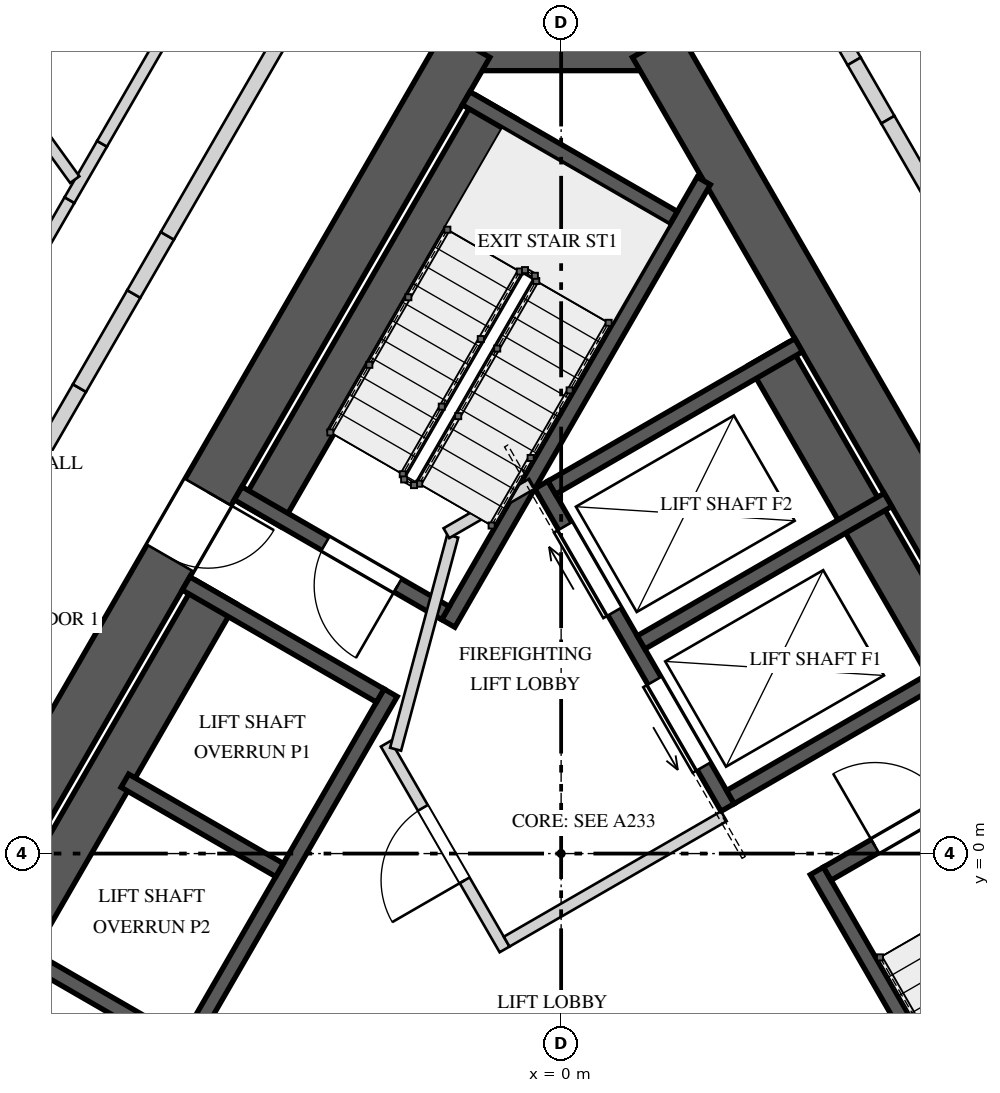
"""IFC4 building model, lengths in metres.
Left out: names, types, materials, properties, quantities, classifications, styles, units other than length and angle.
Written with IfcOpenShell. Run it as: python <this file> out.ifc"""

import sys

from ifc_helpers import new_model, si_unit, direction, frame, frame_2d, origin, place, context, subcontext, project, spatial, rectangle, extrude, element, fill, save


model = new_model("IFC4")
c1 = context("Model", 3, precision=1e-05, world=origin(), true_north=direction((0.0, 1.0)))
c2 = subcontext(c1, "Body", "Model", "MODEL_VIEW")
j1 = project(units=[si_unit("LENGTHUNIT", "METRE"), si_unit("PLANEANGLEUNIT", "RADIAN")], contexts=[c1])
p1 = place(None, origin())
s1 = spatial("IfcSite", under=j1, at=p1, CompositionType="ELEMENT")
p2 = place(p1, origin())
s2 = spatial("IfcBuilding", under=s1, at=p2, CompositionType="ELEMENT")
p3 = place(p2, frame((0.0, 0.0, 241.2)))
s3 = spatial("IfcBuildingStorey", under=s2, at=p3, CompositionType="ELEMENT", Elevation=241.2)
p4 = place(p3, frame((1.443, 10.65, 0.0), z_axis=(0.0, 0.0, 1.0), x_axis=(-1.0, 0.0, 0.0)))
e1 = element("IfcWall", 1, at=p4, inside=s3, PredefinedType="SHEAR", context=c2, shape_type="SweptSolid", body=[
    extrude(rectangle(XDim=2.887, YDim=0.7, at=frame_2d((1.443, 0.0))), origin(), (0.0, 0.0, 1.0), 4.0),
])
p5 = place(p3, frame((-1.241, 10.65, 0.0), z_axis=(0.0, 0.0, 1.0), x_axis=(-0.500003331888, -0.866023480109, 0.0)))
e2 = element("IfcWall", 2, at=p5, inside=s3, PredefinedType="SHEAR", context=c2, shape_type="SweptSolid", body=[
    extrude(rectangle(XDim=17.205, YDim=0.7, at=frame_2d((8.603, 0.0))), origin(), (0.0, 0.0, 1.0), 4.0),
])
p6 = place(p5, frame((6.808, 0.0, 0.0)))
e3 = element("IfcOpeningElement", 3, at=p6, cuts=e2, PredefinedType="OPENING", context=c2, shape_type="SweptSolid", body=[
    extrude(rectangle(XDim=1.0, YDim=2.4, at=frame_2d((0.5, 1.2))), frame((0.0, 0.36, 0.0), z_axis=(0.0, -1.0, 0.0), x_axis=(1.0, 0.0, 0.0)), (0.0, 0.0, 1.0), 0.72),
])
p7 = place(p5, frame((14.922, 0.0, 0.0)))
e4 = element("IfcOpeningElement", 4, at=p7, cuts=e2, PredefinedType="OPENING", context=c2, shape_type="SweptSolid", body=[
    extrude(rectangle(XDim=0.8, YDim=2.1, at=frame_2d((0.4, 1.05))), frame((0.0, 0.36, 0.0), z_axis=(0.0, -1.0, 0.0), x_axis=(1.0, 0.0, 0.0)), (0.0, 0.0, 1.0), 0.72),
])
p8 = place(p3, frame((9.844, -4.25, 0.0), z_axis=(0.0, 0.0, 1.0), x_axis=(-0.500003331888, 0.866023480109, 0.0)))
e5 = element("IfcWall", 5, at=p8, inside=s3, PredefinedType="SHEAR", context=c2, shape_type="SweptSolid", body=[
    extrude(rectangle(XDim=17.205, YDim=0.7, at=frame_2d((8.603, 0.0))), origin(), (0.0, 0.0, 1.0), 4.0),
])
p9 = place(p8, frame((6.877, 0.0, 0.0)))
e6 = element("IfcOpeningElement", 6, at=p9, cuts=e5, PredefinedType="OPENING", context=c2, shape_type="SweptSolid", body=[
    extrude(rectangle(XDim=1.0, YDim=2.4, at=frame_2d((0.5, 1.2))), frame((0.0, 0.36, 0.0), z_axis=(0.0, -1.0, 0.0), x_axis=(1.0, 0.0, 0.0)), (0.0, 0.0, 1.0), 0.72),
])
p10 = place(p3, frame((-0.853, 9.823, 0.0), z_axis=(0.0, 0.0, 1.0), x_axis=(-0.500009909098, -0.866019682689, 0.0)))
e7 = element("IfcWall", 7, at=p10, inside=s3, PredefinedType="SOLIDWALL", context=c2, shape_type="SweptSolid", body=[
    extrude(rectangle(XDim=6.2, YDim=0.6, at=frame_2d((3.1, 0.0))), origin(), (0.0, 0.0, 1.0), 3.65),
])
p11 = place(p3, frame((1.876, 8.85, 0.0), z_axis=(0.0, 0.0, 1.0), x_axis=(-0.499998042495, -0.866026533947, 0.0)))
e8 = element("IfcWall", 8, at=p11, inside=s3, PredefinedType="SOLIDWALL", context=c2, shape_type="SweptSolid", body=[
    extrude(rectangle(XDim=6.723, YDim=0.2, at=frame_2d((3.361, 0.0))), origin(), (0.0, 0.0, 1.0), 3.65),
])
p12 = place(p3, frame((1.479, 8.361, 0.0), z_axis=(0.0, 0.0, 1.0), x_axis=(-0.866035871367, 0.499981869177, 0.0)))
e9 = element("IfcWall", 9, at=p12, inside=s3, PredefinedType="SOLIDWALL", context=c2, shape_type="SweptSolid", body=[
    extrude(rectangle(XDim=3.15, YDim=0.2, at=frame_2d((1.575, 0.0))), origin(), (0.0, 0.0, 1.0), 3.65),
])
p13 = place(p3, frame((-1.521, 3.165, 0.0), z_axis=(0.0, 0.0, 1.0), x_axis=(-0.866035871367, 0.499981869177, 0.0)))
e10 = element("IfcWall", 10, at=p13, inside=s3, PredefinedType="SOLIDWALL", context=c2, shape_type="SweptSolid", body=[
    extrude(rectangle(XDim=3.15, YDim=0.2, at=frame_2d((1.575, 0.0))), origin(), (0.0, 0.0, 1.0), 3.65),
])
p14 = place(p13, frame((0.725, 0.0, 0.0)))
e11 = element("IfcOpeningElement", 11, at=p14, cuts=e10, PredefinedType="OPENING", context=c2, shape_type="SweptSolid", body=[
    extrude(rectangle(XDim=1.1, YDim=2.4, at=frame_2d((0.55, 1.2))), frame((0.0, 0.11, 0.0), z_axis=(0.0, -1.0, 0.0), x_axis=(1.0, 0.0, 0.0)), (0.0, 0.0, 1.0), 0.22),
])
p15 = place(p3, frame((6.726, -6.05, 0.0), z_axis=(0.0, 0.0, 1.0), x_axis=(-0.499970804718, 0.866042259032, 0.0)))
e12 = element("IfcWall", 12, at=p15, inside=s3, PredefinedType="SOLIDWALL", context=c2, shape_type="SweptSolid", body=[
    extrude(rectangle(XDim=6.723, YDim=0.2, at=frame_2d((3.361, 0.0))), origin(), (0.0, 0.0, 1.0), 3.65),
])
p16 = place(p3, frame((3.501, -0.265, 0.0), z_axis=(0.0, 0.0, 1.0), x_axis=(0.866035871367, 0.499981869177, 0.0)))
e13 = element("IfcWall", 13, at=p16, inside=s3, PredefinedType="SOLIDWALL", context=c2, shape_type="SweptSolid", body=[
    extrude(rectangle(XDim=3.15, YDim=0.2, at=frame_2d((1.575, 0.0))), origin(), (0.0, 0.0, 1.0), 3.65),
])
p17 = place(p16, frame((0.725, 0.0, 0.0)))
e14 = element("IfcOpeningElement", 14, at=p17, cuts=e13, PredefinedType="OPENING", context=c2, shape_type="SweptSolid", body=[
    extrude(rectangle(XDim=1.1, YDim=2.4, at=frame_2d((0.55, 1.2))), frame((0.0, 0.11, 0.0), z_axis=(0.0, -1.0, 0.0), x_axis=(1.0, 0.0, 0.0)), (0.0, 0.0, 1.0), 0.22),
])
p18 = place(p3, frame((-2.243, 2.115, 0.0), z_axis=(0.0, 0.0, 1.0), x_axis=(-0.499996545922, -0.866027397988, 0.0)))
e15 = element("IfcWall", 15, at=p18, inside=s3, PredefinedType="SOLIDWALL", context=c2, shape_type="SweptSolid", body=[
    extrude(rectangle(XDim=5.5, YDim=0.2, at=frame_2d((2.75, 0.0))), origin(), (0.0, 0.0, 1.0), 3.65),
])
p19 = place(p3, frame((-4.538, 3.44, 0.0), z_axis=(0.0, 0.0, 1.0), x_axis=(-0.499996545922, -0.866027397988, 0.0)))
e16 = element("IfcWall", 16, at=p19, inside=s3, PredefinedType="SOLIDWALL", context=c2, shape_type="SweptSolid", body=[
    extrude(rectangle(XDim=5.5, YDim=0.6, at=frame_2d((2.75, 0.0))), origin(), (0.0, 0.0, 1.0), 3.65),
])
p20 = place(p3, frame((-2.38, 2.078, 0.0), z_axis=(0.0, 0.0, 1.0), x_axis=(-0.866060182126, 0.499939757307, 0.0)))
e17 = element("IfcWall", 17, at=p20, inside=s3, PredefinedType="SOLIDWALL", context=c2, shape_type="SweptSolid", body=[
    extrude(rectangle(XDim=2.95, YDim=0.2, at=frame_2d((1.475, 0.0))), origin(), (0.0, 0.0, 1.0), 3.65),
])
p21 = place(p3, frame((-3.705, -0.217, 0.0), z_axis=(0.0, 0.0, 1.0), x_axis=(-0.866016039709, 0.500016218704, 0.0)))
e18 = element("IfcWall", 18, at=p21, inside=s3, PredefinedType="SOLIDWALL", context=c2, shape_type="SweptSolid", body=[
    extrude(rectangle(XDim=2.35, YDim=0.2, at=frame_2d((1.175, 0.0))), origin(), (0.0, 0.0, 1.0), 3.65),
])
p22 = place(p3, frame((-5.03, -2.512, 0.0), z_axis=(0.0, 0.0, 1.0), x_axis=(-0.866003658127, 0.500037662692, 0.0)))
e19 = element("IfcWall", 19, at=p22, inside=s3, PredefinedType="SOLIDWALL", context=c2, shape_type="SweptSolid", body=[
    extrude(rectangle(XDim=2.95, YDim=0.2, at=frame_2d((1.475, 0.0))), origin(), (0.0, 0.0, 1.0), 3.65),
])
p23 = place(p3, frame((2.19, 0.606, 0.0), z_axis=(0.0, 0.0, 1.0), x_axis=(-0.500002801628, 0.866023786258, 0.0)))
e20 = element("IfcWall", 20, at=p23, inside=s3, PredefinedType="SOLIDWALL", context=c2, shape_type="SweptSolid", body=[
    extrude(rectangle(XDim=4.9, YDim=0.2, at=frame_2d((2.45, 0.0))), origin(), (0.0, 0.0, 1.0), 3.65),
])
p24 = place(p23, frame((0.625, 0.0, 0.0)))
e21 = element("IfcOpeningElement", 21, at=p24, cuts=e20, PredefinedType="OPENING", context=c2, shape_type="SweptSolid", body=[
    extrude(rectangle(XDim=1.3, YDim=2.1, at=frame_2d((0.65, 1.05))), frame((0.0, 0.11, 0.0), z_axis=(0.0, -1.0, 0.0), x_axis=(1.0, 0.0, 0.0)), (0.0, 0.0, 1.0), 0.22),
])
p25 = place(p23, frame((2.975, 0.0, 0.0)))
e22 = element("IfcOpeningElement", 22, at=p25, cuts=e20, PredefinedType="OPENING", context=c2, shape_type="SweptSolid", body=[
    extrude(rectangle(XDim=1.3, YDim=2.1, at=frame_2d((0.65, 1.05))), frame((0.0, 0.11, 0.0), z_axis=(0.0, -1.0, 0.0), x_axis=(1.0, 0.0, 0.0)), (0.0, 0.0, 1.0), 0.22),
])
p26 = place(p3, frame((5.178, 2.331, 0.0), z_axis=(0.0, 0.0, 1.0), x_axis=(-0.49998122708, 0.866036242063, 0.0)))
e23 = element("IfcWall", 23, at=p26, inside=s3, PredefinedType="SOLIDWALL", context=c2, shape_type="SweptSolid", body=[
    extrude(rectangle(XDim=4.9, YDim=0.6, at=frame_2d((2.45, 0.0))), origin(), (0.0, 0.0, 1.0), 3.65),
])
p27 = place(p3, frame((2.227, 0.743, 0.0), z_axis=(0.0, 0.0, 1.0), x_axis=(0.866022959057, 0.500004234368, 0.0)))
e24 = element("IfcWall", 24, at=p27, inside=s3, PredefinedType="SOLIDWALL", context=c2, shape_type="SweptSolid", body=[
    extrude(rectangle(XDim=3.75, YDim=0.2, at=frame_2d((1.875, 0.0))), origin(), (0.0, 0.0, 1.0), 3.65),
])
p28 = place(p3, frame((1.052, 2.778, 0.0), z_axis=(0.0, 0.0, 1.0), x_axis=(0.866039234136, 0.499976044363, 0.0)))
e25 = element("IfcWall", 25, at=p28, inside=s3, PredefinedType="SOLIDWALL", context=c2, shape_type="SweptSolid", body=[
    extrude(rectangle(XDim=3.75, YDim=0.2, at=frame_2d((1.875, 0.0))), origin(), (0.0, 0.0, 1.0), 3.65),
])
p29 = place(p3, frame((-0.123, 4.813, 0.0), z_axis=(0.0, 0.0, 1.0), x_axis=(0.866022959057, 0.500004234368, 0.0)))
e26 = element("IfcWall", 26, at=p29, inside=s3, PredefinedType="SOLIDWALL", context=c2, shape_type="SweptSolid", body=[
    extrude(rectangle(XDim=3.75, YDim=0.2, at=frame_2d((1.875, 0.0))), origin(), (0.0, 0.0, 1.0), 3.65),
])
p30 = place(p3, frame((-0.744, -1.261, 0.0), z_axis=(0.0, 0.0, 1.0), x_axis=(-0.500004234368, 0.866022959057, 0.0)))
e27 = element("IfcWall", 27, at=p30, inside=s3, PredefinedType="PARTITIONING", context=c2, shape_type="SweptSolid", body=[
    extrude(rectangle(XDim=3.125, YDim=0.15, at=frame_2d((1.562, 0.0))), origin(), (0.0, 0.0, 1.0), 3.65),
])
p31 = place(p30, frame((1.05, 0.0, 0.0)))
e28 = element("IfcOpeningElement", 28, at=p31, cuts=e27, PredefinedType="OPENING", context=c2, shape_type="SweptSolid", body=[
    extrude(rectangle(XDim=1.1, YDim=2.4, at=frame_2d((0.55, 1.2))), frame((0.0, 0.085, 0.0), z_axis=(0.0, -1.0, 0.0), x_axis=(1.0, 0.0, 0.0)), (0.0, 0.0, 1.0), 0.17),
])
p32 = place(p3, frame((-0.717, -1.159, 0.0), z_axis=(0.0, 0.0, 1.0), x_axis=(0.866008176907, 0.50002983664, 0.0)))
e29 = element("IfcWall", 29, at=p32, inside=s3, PredefinedType="PARTITIONING", context=c2, shape_type="SweptSolid", body=[
    extrude(rectangle(XDim=3.3, YDim=0.15, at=frame_2d((1.65, 0.0))), origin(), (0.0, 0.0, 1.0), 3.65),
])
p33 = place(p3, frame((-2.178, 1.372, 0.0), z_axis=(0.0, 0.0, 1.0), x_axis=(0.258808958833, 0.96592852884, 0.0)))
e30 = element("IfcWall", 30, at=p33, inside=s3, PredefinedType="PARTITIONING", context=c2, shape_type="SweptSolid", body=[
    extrude(rectangle(XDim=2.903, YDim=0.15, at=frame_2d((1.451, 0.0))), origin(), (0.0, 0.0, 1.0), 3.65),
])
p34 = place(p3, frame((-1.51, 4.215, 0.0), z_axis=(0.0, 0.0, 1.0), x_axis=(0.866085525409, 0.49989585183, 0.0)))
e31 = element("IfcWall", 31, at=p34, inside=s3, PredefinedType="PARTITIONING", context=c2, shape_type="SweptSolid", body=[
    extrude(rectangle(XDim=1.3, YDim=0.15, at=frame_2d((0.65, 0.0))), origin(), (0.0, 0.0, 1.0), 3.65),
])
p35 = place(p3, frame((-7.38, 7.017, 0.0), z_axis=(0.0, 0.0, 1.0), x_axis=(0.500012159746, 0.866018383238, 0.0)))
e32 = element("IfcWall", 32, at=p35, inside=s3, PredefinedType="PARTITIONING", context=c2, shape_type="SweptSolid", body=[
    extrude(rectangle(XDim=1.824, YDim=0.15, at=frame_2d((0.912, 0.0))), origin(), (0.0, 0.0, 1.0), 3.65),
])
p36 = place(p3, frame((-6.468, 8.597, 0.0), z_axis=(0.0, 0.0, 1.0), x_axis=(0.500035209441, 0.86600507465, 0.0)))
e33 = element("IfcWall", 33, at=p36, inside=s3, PredefinedType="PARTITIONING", context=c2, shape_type="SweptSolid", body=[
    extrude(rectangle(XDim=0.856, YDim=0.15, at=frame_2d((0.428, 0.0))), origin(), (0.0, 0.0, 1.0), 2.75),
])
p37 = place(p3, frame((-6.04, 9.338, 0.0), z_axis=(0.0, 0.0, 1.0), x_axis=(0.500014044516, 0.866017295027, 0.0)))
e34 = element("IfcWall", 34, at=p37, inside=s3, PredefinedType="PARTITIONING", context=c2, shape_type="SweptSolid", body=[
    extrude(rectangle(XDim=5.556, YDim=0.15, at=frame_2d((2.778, 0.0))), origin(), (0.0, 0.0, 1.0), 3.65),
])
p38 = place(p37, frame((1.971, 0.0, 0.0)))
e35 = element("IfcOpeningElement", 35, at=p38, cuts=e34, PredefinedType="OPENING", context=c2, shape_type="SweptSolid", body=[
    extrude(rectangle(XDim=0.95, YDim=2.4, at=frame_2d((0.475, 1.2))), frame((0.0, 0.085, 0.0), z_axis=(0.0, -1.0, 0.0), x_axis=(1.0, 0.0, 0.0)), (0.0, 0.0, 1.0), 0.17),
])
p39 = place(p3, frame((-11.858, 16.429, 0.0), z_axis=(0.0, 0.0, 1.0), x_axis=(0.585232485498, -0.810865548607, 0.0)))
e36 = element("IfcWall", 36, at=p39, inside=s3, PredefinedType="PARTITIONING", context=c2, shape_type="SweptSolid", body=[
    extrude(rectangle(XDim=9.327, YDim=0.15, at=frame_2d((4.664, 0.0))), origin(), (0.0, 0.0, 1.0), 2.75),
])
p40 = place(p3, frame((-6.795, 5.33, 0.0), z_axis=(0.0, 0.0, 1.0), x_axis=(0.499975954304, 0.866039286129, 0.0)))
e37 = element("IfcWall", 37, at=p40, inside=s3, PredefinedType="SOLIDWALL", context=c2, shape_type="SweptSolid", body=[
    extrude(rectangle(XDim=0.917, YDim=0.2, at=frame_2d((0.458, 0.0))), origin(), (0.0, 0.0, 1.0), 2.55),
])
p41 = place(p3, frame((-6.337, 6.124, 0.0), z_axis=(0.0, 0.0, 1.0), x_axis=(0.499904796234, 0.866080362727, 0.0)))
e38 = element("IfcWall", 38, at=p41, inside=s3, PredefinedType="SOLIDWALL", context=c2, shape_type="SweptSolid", body=[
    extrude(rectangle(XDim=1.429, YDim=0.2, at=frame_2d((0.715, 0.0))), origin(), (0.0, 0.0, 1.0), 3.65),
])
p42 = place(p3, frame((-5.622, 7.362, 0.0), z_axis=(0.0, 0.0, 1.0), x_axis=(0.500121072013, 0.86595549154, 0.0)))
e39 = element("IfcWall", 39, at=p42, inside=s3, PredefinedType="SOLIDWALL", context=c2, shape_type="SweptSolid", body=[
    extrude(rectangle(XDim=0.884, YDim=0.2, at=frame_2d((0.442, 0.0))), origin(), (0.0, 0.0, 1.0), 2.75),
])
p43 = place(p3, frame((-5.18, 8.127, 0.0), z_axis=(0.0, 0.0, 1.0), x_axis=(0.499995433041, 0.866028040503, 0.0)))
e40 = element("IfcWall", 40, at=p43, inside=s3, PredefinedType="SOLIDWALL", context=c2, shape_type="SweptSolid", body=[
    extrude(rectangle(XDim=5.161, YDim=0.2, at=frame_2d((2.581, 0.0))), origin(), (0.0, 0.0, 1.0), 3.65),
])
p44 = place(p3, frame((2.483, 12.8, 0.0), z_axis=(0.0, 0.0, 1.0), x_axis=(0.499956000529, -0.8660508054, 0.0)))
e41 = element("IfcWall", 41, at=p44, inside=s3, PredefinedType="SOLIDWALL", context=c2, shape_type="SweptSolid", body=[
    extrude(rectangle(XDim=2.745, YDim=0.2, at=frame_2d((1.373, 0.0))), origin(), (0.0, 0.0, 1.0), 3.65),
])
p45 = place(p3, frame((3.855, 10.423, 0.0), z_axis=(0.0, 0.0, 1.0), x_axis=(0.500135429527, -0.86594719939, 0.0)))
e42 = element("IfcWall", 42, at=p45, inside=s3, PredefinedType="SOLIDWALL", context=c2, shape_type="SweptSolid", body=[
    extrude(rectangle(XDim=0.887, YDim=0.2, at=frame_2d((0.443, 0.0))), origin(), (0.0, 0.0, 1.0), 2.95),
])
p46 = place(p3, frame((4.299, 9.655, 0.0), z_axis=(0.0, 0.0, 1.0), x_axis=(0.499997905474, -0.866026613056, 0.0)))
e43 = element("IfcWall", 43, at=p46, inside=s3, PredefinedType="SOLIDWALL", context=c2, shape_type="SweptSolid", body=[
    extrude(rectangle(XDim=3.811, YDim=0.2, at=frame_2d((1.905, 0.0))), origin(), (0.0, 0.0, 1.0), 3.65),
])
p47 = place(p14, origin())
e44 = element("IfcDoor", 44, at=p47, inside=s3, OperationType="SINGLE_SWING_RIGHT", PredefinedType="DOOR", context=c2, shape_type="SweptSolid", body=[
    extrude(rectangle(XDim=1.1, YDim=2.4, at=frame_2d((0.55, 1.2))), frame((0.0, 0.025, 0.0), z_axis=(0.0, -1.0, 0.0), x_axis=(1.0, 0.0, 0.0)), (0.0, 0.0, 1.0), 0.05),
])
fill(e11, e44)
p48 = place(p17, origin())
e45 = element("IfcDoor", 45, at=p48, inside=s3, OperationType="SINGLE_SWING_RIGHT", PredefinedType="DOOR", context=c2, shape_type="SweptSolid", body=[
    extrude(rectangle(XDim=1.1, YDim=2.4, at=frame_2d((0.55, 1.2))), frame((0.0, 0.025, 0.0), z_axis=(0.0, -1.0, 0.0), x_axis=(1.0, 0.0, 0.0)), (0.0, 0.0, 1.0), 0.05),
])
fill(e14, e45)
p49 = place(p24, origin())
e46 = element("IfcDoor", 46, at=p49, inside=s3, OperationType="SLIDING_TO_LEFT", PredefinedType="DOOR", context=c2, shape_type="SweptSolid", body=[
    extrude(rectangle(XDim=1.3, YDim=2.1, at=frame_2d((0.65, 1.05))), frame((0.0, 0.025, 0.0), z_axis=(0.0, -1.0, 0.0), x_axis=(1.0, 0.0, 0.0)), (0.0, 0.0, 1.0), 0.05),
])
fill(e21, e46)
p50 = place(p25, origin())
e47 = element("IfcDoor", 47, at=p50, inside=s3, OperationType="SLIDING_TO_RIGHT", PredefinedType="DOOR", context=c2, shape_type="SweptSolid", body=[
    extrude(rectangle(XDim=1.3, YDim=2.1, at=frame_2d((0.65, 1.05))), frame((0.0, 0.025, 0.0), z_axis=(0.0, -1.0, 0.0), x_axis=(1.0, 0.0, 0.0)), (0.0, 0.0, 1.0), 0.05),
])
fill(e22, e47)
p51 = place(p31, origin())
e48 = element("IfcDoor", 48, at=p51, inside=s3, OperationType="SINGLE_SWING_LEFT", PredefinedType="DOOR", context=c2, shape_type="SweptSolid", body=[
    extrude(rectangle(XDim=1.1, YDim=2.4, at=frame_2d((0.55, 1.2))), frame((0.0, 0.025, 0.0), z_axis=(0.0, -1.0, 0.0), x_axis=(1.0, 0.0, 0.0)), (0.0, 0.0, 1.0), 0.05),
])
fill(e28, e48)
p52 = place(p6, origin())
e49 = element("IfcDoor", 49, at=p52, inside=s3, OperationType="SINGLE_SWING_RIGHT", PredefinedType="DOOR", context=c2, shape_type="SweptSolid", body=[
    extrude(rectangle(XDim=1.0, YDim=2.4, at=frame_2d((0.5, 1.2))), frame((0.0, 0.025, 0.0), z_axis=(0.0, -1.0, 0.0), x_axis=(1.0, 0.0, 0.0)), (0.0, 0.0, 1.0), 0.05),
])
fill(e3, e49)
save(model, sys.argv[1])
